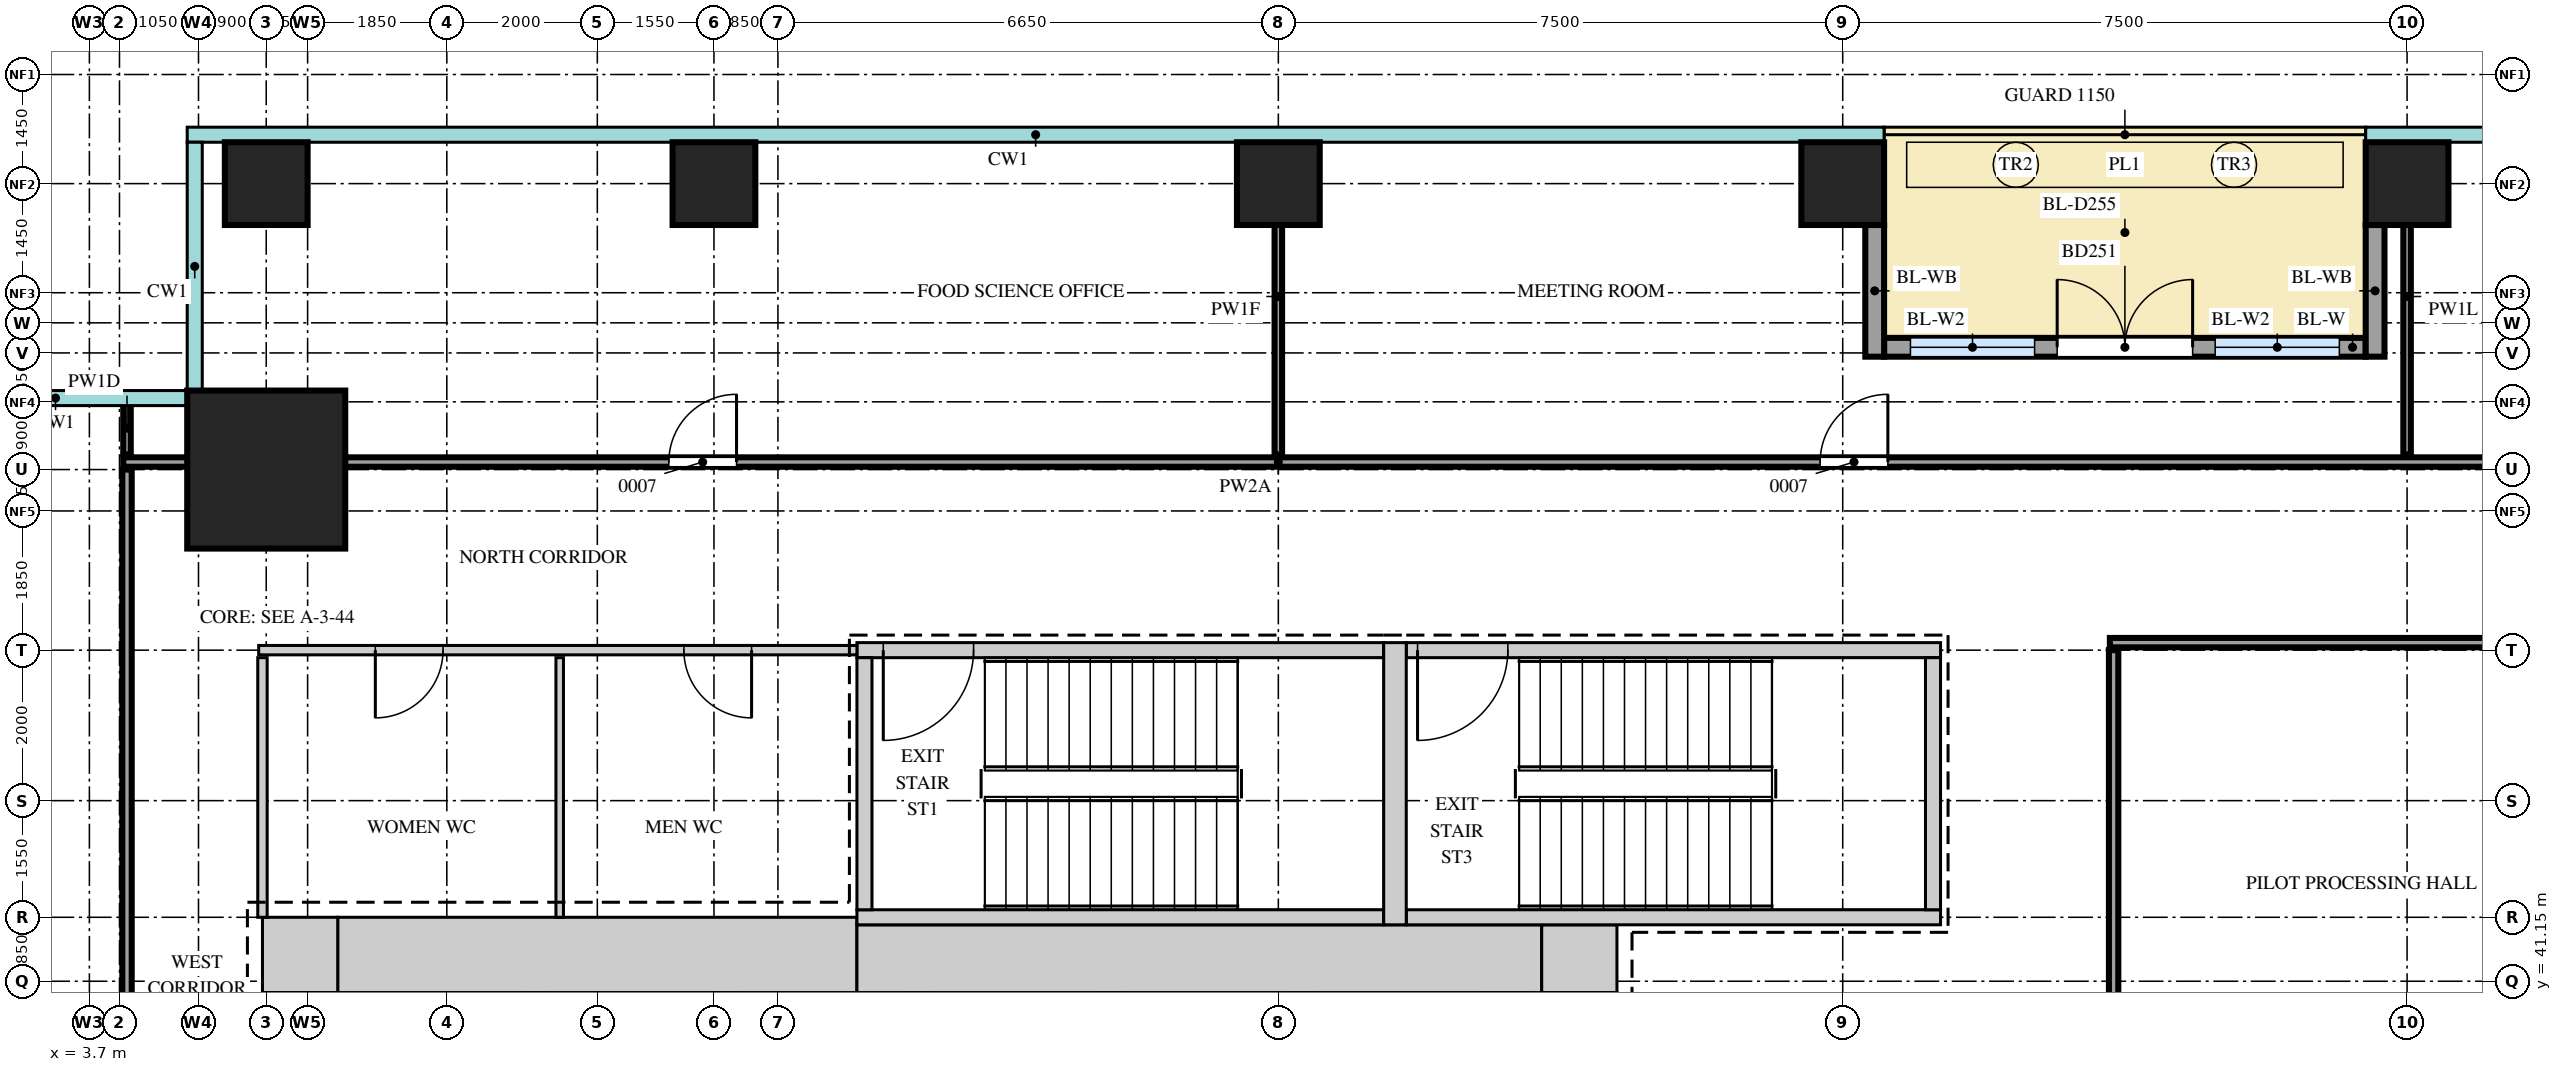
"""IFC4 building model, lengths in metres.
Left out: names, types, materials, properties, quantities, classifications, styles, units other than length and angle.
Written with IfcOpenShell. Run it as: python <this file> out.ifc"""

import sys

from ifc_helpers import new_model, si_unit, direction, frame, frame_2d, origin, origin_2d, place, context, subcontext, project, spatial, rectangle, extrude, source, transform, mapped, element, fill, save


model = new_model("IFC4")
c1 = context("Model", 3, precision=1e-05, world=origin(), true_north=direction((0.0, 1.0)))
c2 = subcontext(c1, "Body", "Model", "MODEL_VIEW")
j1 = project(units=[si_unit("LENGTHUNIT", "METRE"), si_unit("PLANEANGLEUNIT", "RADIAN")], contexts=[c1])
p1 = place(None, origin())
s1 = spatial("IfcSite", under=j1, at=p1, CompositionType="ELEMENT")
p2 = place(p1, origin())
s2 = spatial("IfcBuilding", under=s1, at=p2, CompositionType="ELEMENT")
p3 = place(p2, frame((0.0, 0.0, 119.1)))
s3 = spatial("IfcBuildingStorey", under=s2, at=p3, CompositionType="ELEMENT", Elevation=119.1)
m1 = source(origin(), c2, "Body", "SweptSolid", [
    extrude(rectangle(XDim=6.9, YDim=1.0, at=frame_2d((3.45, 0.0))), origin(), (0.0, 0.0, 1.0), 4.1),
])
p4 = place(p3, frame((7.0, 41.5, 0.0), z_axis=(0.0, 0.0, 1.0), x_axis=(1.0, 0.0, 0.0)))
e1 = element("IfcWall", 1, at=p4, inside=s3, PredefinedType="SHEAR", context=c2, shape_type="MappedRepresentation", body=[
    mapped(m1, transform((0.0, 0.0, 0.0))),
])
m2 = source(origin(), c2, "Body", "SweptSolid", [
    extrude(rectangle(XDim=9.1, YDim=0.9, at=frame_2d((4.55, 0.0))), origin(), (0.0, 0.0, 1.0), 4.1),
])
p5 = place(p3, frame((13.9, 41.45, 0.0), z_axis=(0.0, 0.0, 1.0), x_axis=(1.0, 0.0, 0.0)))
e2 = element("IfcWall", 2, at=p5, inside=s3, PredefinedType="SHEAR", context=c2, shape_type="MappedRepresentation", body=[
    mapped(m2, transform((0.0, 0.0, 0.0))),
])
m3 = source(origin(), c2, "Body", "SweptSolid", [
    extrude(rectangle(XDim=1.0, YDim=0.9, at=frame_2d((0.5, 0.0))), origin(), (0.0, 0.0, 1.0), 4.1),
])
p6 = place(p3, frame((23.0, 41.45, 0.0), z_axis=(0.0, 0.0, 1.0), x_axis=(1.0, 0.0, 0.0)))
e3 = element("IfcWall", 3, at=p6, inside=s3, PredefinedType="SHEAR", context=c2, shape_type="MappedRepresentation", body=[
    mapped(m3, transform((0.0, 0.0, 0.0))),
])
m4 = source(origin(), c2, "Body", "SweptSolid", [
    extrude(rectangle(XDim=1.0, YDim=1.0, at=frame_2d((0.5, 0.0))), origin(), (0.0, 0.0, 1.0), 4.1),
])
p7 = place(p3, frame((6.0, 41.5, 0.0), z_axis=(0.0, 0.0, 1.0), x_axis=(1.0, 0.0, 0.0)))
e4 = element("IfcWall", 4, at=p7, inside=s3, PredefinedType="SHEAR", context=c2, shape_type="MappedRepresentation", body=[
    mapped(m4, transform((0.0, 0.0, 0.0))),
])
m5 = source(origin(), c2, "Body", "SweptSolid", [
    extrude(rectangle(XDim=7.0, YDim=0.2, at=frame_2d((3.5, 0.0))), origin(), (0.0, 0.0, 1.0), 4.1),
])
p8 = place(p3, frame((13.9, 45.55, 0.0), z_axis=(0.0, 0.0, 1.0), x_axis=(1.0, 0.0, 0.0)))
e5 = element("IfcWall", 5, at=p8, inside=s3, PredefinedType="SHEAR", context=c2, shape_type="MappedRepresentation", body=[
    mapped(m5, transform((0.0, 0.0, 0.0))),
])
m6 = source(origin(), c2, "Body", "SweptSolid", [
    extrude(rectangle(XDim=1.2, YDim=2.1, at=frame_2d((0.6, 1.05))), frame((0.0, 0.11, 0.0), z_axis=(0.0, -1.0, 0.0), x_axis=(1.0, 0.0, 0.0)), (0.0, 0.0, 1.0), 0.22),
])
p9 = place(p8, frame((0.35, 0.0, 0.0)))
e6 = element("IfcOpeningElement", 6, at=p9, cuts=e5, PredefinedType="OPENING", context=c2, shape_type="MappedRepresentation", body=[
    mapped(m6, transform((0.0, 0.0, 0.0))),
])
p10 = place(p3, frame((13.9, 42.0, 0.0), z_axis=(0.0, 0.0, 1.0), x_axis=(1.0, 0.0, 0.0)))
e7 = element("IfcWall", 7, at=p10, inside=s3, PredefinedType="SHEAR", context=c2, shape_type="MappedRepresentation", body=[
    mapped(m5, transform((0.0, 0.0, 0.0))),
])
m7 = source(origin(), c2, "Body", "SweptSolid", [
    extrude(rectangle(XDim=7.1, YDim=0.2, at=frame_2d((3.55, 0.0))), origin(), (0.0, 0.0, 1.0), 4.1),
])
p11 = place(p3, frame((21.2, 45.55, 0.0), z_axis=(0.0, 0.0, 1.0), x_axis=(1.0, 0.0, 0.0)))
e8 = element("IfcWall", 8, at=p11, inside=s3, PredefinedType="SHEAR", context=c2, shape_type="MappedRepresentation", body=[
    mapped(m7, transform((0.0, 0.0, 0.0))),
])
p12 = place(p11, frame((0.15, 0.0, 0.0)))
e9 = element("IfcOpeningElement", 9, at=p12, cuts=e8, PredefinedType="OPENING", context=c2, shape_type="MappedRepresentation", body=[
    mapped(m6, transform((0.0, 0.0, 0.0))),
])
p13 = place(p3, frame((21.2, 42.0, 0.0), z_axis=(0.0, 0.0, 1.0), x_axis=(1.0, 0.0, 0.0)))
e10 = element("IfcWall", 10, at=p13, inside=s3, PredefinedType="SHEAR", context=c2, shape_type="MappedRepresentation", body=[
    mapped(m7, transform((0.0, 0.0, 0.0))),
])
m8 = source(origin(), c2, "Body", "SweptSolid", [
    extrude(rectangle(XDim=3.75, YDim=0.3, at=frame_2d((1.875, 0.0))), origin(), (0.0, 0.0, 1.0), 4.1),
])
p14 = place(p3, frame((21.05, 41.9, 0.0), z_axis=(0.0, 0.0, 1.0), x_axis=(0.0, 1.0, 0.0)))
e11 = element("IfcWall", 11, at=p14, inside=s3, PredefinedType="SHEAR", context=c2, shape_type="MappedRepresentation", body=[
    mapped(m8, transform((0.0, 0.0, 0.0))),
])
m9 = source(origin(), c2, "Body", "SweptSolid", [
    extrude(rectangle(XDim=3.35, YDim=0.2, at=frame_2d((1.675, 0.0))), origin(), (0.0, 0.0, 1.0), 4.1),
])
for number, where, z_axis, x_axis in (
    (12, (14.0, 42.1, 0.0), (0.0, 0.0, 1.0), (0.0, 1.0, 0.0)),
    (13, (28.2, 42.1, 0.0), (0.0, 0.0, 1.0), (0.0, 1.0, 0.0)),
):
    element("IfcWall", number, at=place(p3, frame(where, z_axis=z_axis, x_axis=x_axis)), inside=s3, PredefinedType="SHEAR", context=c2, shape_type="MappedRepresentation", body=[
        mapped(m9, transform((0.0, 0.0, 0.0))),
    ])
m10 = source(origin(), c2, "Body", "SweptSolid", [
    extrude(rectangle(XDim=2.1, YDim=2.1, at=origin_2d()), origin(), (0.0, 0.0, 1.0), 4.4),
])
p15 = place(p3, frame((6.05, 47.95, 0.0), z_axis=(0.0, 0.0, 1.0), x_axis=(1.0, 0.0, 0.0)))
e14 = element("IfcColumn", 14, at=p15, inside=s3, PredefinedType="COLUMN", context=c2, shape_type="MappedRepresentation", body=[
    mapped(m10, transform((0.0, 0.0, 0.0))),
])
m11 = source(origin(), c2, "Body", "SweptSolid", [
    extrude(rectangle(XDim=1.1, YDim=1.1, at=origin_2d()), origin(), (0.0, 0.0, 1.0), 4.1),
])
for number, where, z_axis, x_axis in (
    (15, (6.05, 51.75, 0.0), (0.0, 0.0, 1.0), (1.0, 0.0, 0.0)),
    (16, (12.0, 51.75, 0.0), (0.0, 0.0, 1.0), (1.0, 0.0, 0.0)),
    (17, (19.5, 51.75, 0.0), (0.0, 0.0, 1.0), (1.0, 0.0, 0.0)),
    (18, (27.0, 51.75, 0.0), (0.0, 0.0, 1.0), (1.0, 0.0, 0.0)),
    (19, (34.5, 51.75, 0.0), (0.0, 0.0, 1.0), (1.0, 0.0, 0.0)),
):
    element("IfcColumn", number, at=place(p3, frame(where, z_axis=z_axis, x_axis=x_axis)), inside=s3, PredefinedType="COLUMN", context=c2, shape_type="MappedRepresentation", body=[
        mapped(m11, transform((0.0, 0.0, 0.0))),
    ])
m12 = source(origin(), c2, "Body", "SweptSolid", [
    extrude(rectangle(XDim=6.4, YDim=0.25, at=frame_2d((3.2, 0.0))), origin(), (0.0, 0.0, 1.0), 4.1),
])
p16 = place(p3, frame((27.55, 49.575, 0.0), z_axis=(0.0, 0.0, 1.0), x_axis=(1.0, 0.0, 0.0)))
e20 = element("IfcWall", 20, at=p16, inside=s3, PredefinedType="SOLIDWALL", context=c2, shape_type="MappedRepresentation", body=[
    mapped(m12, transform((0.0, 0.0, 0.0))),
])
m13 = source(origin(), c2, "Body", "SweptSolid", [
    extrude(rectangle(XDim=1.65, YDim=2.4, at=frame_2d((0.825, 1.2))), frame((0.0, 0.135, 0.0), z_axis=(0.0, -1.0, 0.0), x_axis=(1.0, 0.0, 0.0)), (0.0, 0.0, 1.0), 0.27),
])
p17 = place(p16, frame((0.35, 0.0, 0.0)))
e21 = element("IfcOpeningElement", 21, at=p17, cuts=e20, PredefinedType="OPENING", context=c2, shape_type="MappedRepresentation", body=[
    mapped(m13, transform((0.0, 0.0, 0.0))),
])
p18 = place(p16, frame((4.4, 0.0, 0.0)))
e22 = element("IfcOpeningElement", 22, at=p18, cuts=e20, PredefinedType="OPENING", context=c2, shape_type="MappedRepresentation", body=[
    mapped(m13, transform((0.0, 0.0, 0.0))),
])
m14 = source(origin(), c2, "Body", "SweptSolid", [
    extrude(rectangle(XDim=1.8, YDim=2.4, at=frame_2d((0.9, 1.2))), frame((0.0, 0.135, 0.0), z_axis=(0.0, -1.0, 0.0), x_axis=(1.0, 0.0, 0.0)), (0.0, 0.0, 1.0), 0.27),
])
p19 = place(p16, frame((2.3, 0.0, 0.0)))
e23 = element("IfcOpeningElement", 23, at=p19, cuts=e20, PredefinedType="OPENING", context=c2, shape_type="MappedRepresentation", body=[
    mapped(m14, transform((0.0, 0.0, 0.0))),
])
m15 = source(origin(), c2, "Body", "SweptSolid", [
    extrude(rectangle(XDim=1.75, YDim=0.25, at=frame_2d((0.875, 0.0))), origin(), (0.0, 0.0, 1.0), 3.8),
])
for number, where, z_axis, x_axis in (
    (24, (27.425, 51.2, 0.0), (0.0, 0.0, 1.0), (0.0, -1.0, 0.0)),
    (25, (34.075, 51.2, 0.0), (0.0, 0.0, 1.0), (0.0, -1.0, 0.0)),
):
    element("IfcWall", number, at=place(p3, frame(where, z_axis=z_axis, x_axis=x_axis)), inside=s3, PredefinedType="SOLIDWALL", context=c2, shape_type="MappedRepresentation", body=[
        mapped(m15, transform((0.0, 0.0, 0.0))),
    ])
m16 = source(origin(), c2, "Body", "SweptSolid", [
    extrude(rectangle(XDim=28.75, YDim=0.125, at=frame_2d((14.375, 0.0))), origin(), (0.0, 0.0, 1.0), 4.2),
])
p20 = place(p3, frame((4.2, 19.2, 0.0), z_axis=(0.0, 0.0, 1.0), x_axis=(0.0, 1.0, 0.0)))
e26 = element("IfcWall", 26, at=p20, inside=s3, PredefinedType="PARTITIONING", context=c2, shape_type="MappedRepresentation", body=[
    mapped(m16, transform((0.0, 0.0, 0.0))),
])
m17 = source(origin(), c2, "Body", "SweptSolid", [
    extrude(rectangle(XDim=0.9, YDim=2.1, at=frame_2d((0.45, 1.05))), frame((0.0, 0.073, 0.0), z_axis=(0.0, -1.0, 0.0), x_axis=(1.0, 0.0, 0.0)), (0.0, 0.0, 1.0), 0.145),
])
p21 = place(p20, frame((3.45, 0.0, 0.0)))
e27 = element("IfcOpeningElement", 27, at=p21, cuts=e26, PredefinedType="OPENING", context=c2, shape_type="MappedRepresentation", body=[
    mapped(m17, transform((0.0, 0.0, 0.0))),
])
p22 = place(p20, frame((16.5, 0.0, 0.0)))
e28 = element("IfcOpeningElement", 28, at=p22, cuts=e26, PredefinedType="OPENING", context=c2, shape_type="MappedRepresentation", body=[
    mapped(m17, transform((0.0, 0.0, 0.0))),
])
m18 = source(origin(), c2, "Body", "SweptSolid", [
    extrude(rectangle(XDim=9.45, YDim=0.125, at=frame_2d((4.725, 0.0))), origin(), (0.0, 0.0, 1.0), 4.2),
])
p23 = place(p3, frame((30.6, 36.1, 0.0), z_axis=(0.0, 0.0, 1.0), x_axis=(0.0, 1.0, 0.0)))
e29 = element("IfcWall", 29, at=p23, inside=s3, PredefinedType="PARTITIONING", context=c2, shape_type="MappedRepresentation", body=[
    mapped(m18, transform((0.0, 0.0, 0.0))),
])
m19 = source(origin(), c2, "Body", "SweptSolid", [
    extrude(rectangle(XDim=3.45, YDim=0.125, at=frame_2d((1.725, 0.0))), origin(), (0.0, 0.0, 1.0), 4.2),
])
p24 = place(p3, frame((6.0, 42.0, 0.0), z_axis=(0.0, 0.0, 1.0), x_axis=(0.0, 1.0, 0.0)))
e30 = element("IfcWall", 30, at=p24, inside=s3, PredefinedType="PARTITIONING", context=c2, shape_type="MappedRepresentation", body=[
    mapped(m19, transform((0.0, 0.0, 0.0))),
])
m20 = source(origin(), c2, "Body", "SweptSolid", [
    extrude(rectangle(XDim=3.45, YDim=0.1, at=frame_2d((1.725, 0.0))), origin(), (0.0, 0.0, 1.0), 4.2),
])
p25 = place(p3, frame((9.95, 42.0, 0.0), z_axis=(0.0, 0.0, 1.0), x_axis=(0.0, 1.0, 0.0)))
e31 = element("IfcWall", 31, at=p25, inside=s3, PredefinedType="PARTITIONING", context=c2, shape_type="MappedRepresentation", body=[
    mapped(m20, transform((0.0, 0.0, 0.0))),
])
m21 = source(origin(), c2, "Body", "SweptSolid", [
    extrude(rectangle(XDim=7.95, YDim=0.125, at=frame_2d((3.975, 0.0))), origin(), (0.0, 0.0, 1.0), 4.2),
])
p26 = place(p3, frame((5.95, 45.55, 0.0), z_axis=(0.0, 0.0, 1.0), x_axis=(1.0, 0.0, 0.0)))
e32 = element("IfcWall", 32, at=p26, inside=s3, PredefinedType="PARTITIONING", context=c2, shape_type="MappedRepresentation", body=[
    mapped(m21, transform((0.0, 0.0, 0.0))),
])
p27 = place(p26, frame((1.55, 0.0, 0.0)))
e33 = element("IfcOpeningElement", 33, at=p27, cuts=e32, PredefinedType="OPENING", context=c2, shape_type="MappedRepresentation", body=[
    mapped(m17, transform((0.0, 0.0, 0.0))),
])
p28 = place(p26, frame((5.65, 0.0, 0.0)))
e34 = element("IfcOpeningElement", 34, at=p28, cuts=e32, PredefinedType="OPENING", context=c2, shape_type="MappedRepresentation", body=[
    mapped(m17, transform((0.0, 0.0, 0.0))),
])
m22 = source(origin(), c2, "Body", "SweptSolid", [
    extrude(rectangle(XDim=13.5, YDim=0.125, at=frame_2d((6.75, 0.0))), origin(), (0.0, 0.0, 1.0), 4.2),
])
p29 = place(p3, frame((30.55, 45.65, 0.0), z_axis=(0.0, 0.0, 1.0), x_axis=(1.0, 0.0, 0.0)))
e35 = element("IfcWall", 35, at=p29, inside=s3, PredefinedType="PARTITIONING", context=c2, shape_type="MappedRepresentation", body=[
    mapped(m22, transform((0.0, 0.0, 0.0))),
])
m23 = source(origin(), c2, "Body", "SweptSolid", [
    extrude(rectangle(XDim=42.2, YDim=0.125, at=frame_2d((21.1, 0.0))), origin(), (0.0, 0.0, 1.0), 3.55),
])
p30 = place(p3, frame((4.15, 48.05, 0.0), z_axis=(0.0, 0.0, 1.0), x_axis=(1.0, 0.0, 0.0)))
e36 = element("IfcWall", 36, at=p30, inside=s3, PredefinedType="PARTITIONING", context=c2, shape_type="MappedRepresentation", body=[
    mapped(m23, transform((0.0, 0.0, 0.0))),
])
p31 = place(p30, frame((7.25, 0.0, 0.0)))
e37 = element("IfcOpeningElement", 37, at=p31, cuts=e36, PredefinedType="OPENING", context=c2, shape_type="MappedRepresentation", body=[
    mapped(m17, transform((0.0, 0.0, 0.0))),
])
p32 = place(p30, frame((22.55, 0.0, 0.0)))
e38 = element("IfcOpeningElement", 38, at=p32, cuts=e36, PredefinedType="OPENING", context=c2, shape_type="MappedRepresentation", body=[
    mapped(m17, transform((0.0, 0.0, 0.0))),
])
p33 = place(p30, frame((35.85, 0.0, 0.0)))
e39 = element("IfcOpeningElement", 39, at=p33, cuts=e36, PredefinedType="OPENING", context=c2, shape_type="MappedRepresentation", body=[
    mapped(m17, transform((0.0, 0.0, 0.0))),
])
m24 = source(origin(), c2, "Body", "SweptSolid", [
    extrude(rectangle(XDim=0.7, YDim=0.1, at=frame_2d((0.35, 0.0))), origin(), (0.0, 0.0, 1.0), 4.2),
])
p34 = place(p3, frame((4.2, 48.15, 0.0), z_axis=(0.0, 0.0, 1.0), x_axis=(0.0, 1.0, 0.0)))
e40 = element("IfcWall", 40, at=p34, inside=s3, PredefinedType="PARTITIONING", context=c2, shape_type="MappedRepresentation", body=[
    mapped(m24, transform((0.0, 0.0, 0.0))),
])
m25 = source(origin(), c2, "Body", "SweptSolid", [
    extrude(rectangle(XDim=4.2, YDim=0.1, at=frame_2d((2.1, 0.0))), origin(), (0.0, 0.0, 1.0), 3.77),
])
p35 = place(p3, frame((19.5, 48.15, 0.0), z_axis=(0.0, 0.0, 1.0), x_axis=(0.0, 1.0, 0.0)))
e41 = element("IfcWall", 41, at=p35, inside=s3, PredefinedType="PARTITIONING", context=c2, shape_type="MappedRepresentation", body=[
    mapped(m25, transform((0.0, 0.0, 0.0))),
])
m26 = source(origin(), c2, "Body", "SweptSolid", [
    extrude(rectangle(XDim=4.2, YDim=0.1, at=frame_2d((2.1, 0.0))), origin(), (0.0, 0.0, 1.0), 3.6),
])
p36 = place(p3, frame((34.5, 48.15, 0.0), z_axis=(0.0, 0.0, 1.0), x_axis=(0.0, 1.0, 0.0)))
e42 = element("IfcWall", 42, at=p36, inside=s3, PredefinedType="PARTITIONING", context=c2, shape_type="MappedRepresentation", body=[
    mapped(m26, transform((0.0, 0.0, 0.0))),
])
m27 = source(origin(), c2, "Body", "SweptSolid", [
    extrude(rectangle(XDim=1.65, YDim=2.4, at=frame_2d((0.825, 1.2))), frame((0.0, 0.03, 0.0), z_axis=(0.0, -1.0, 0.0), x_axis=(1.0, 0.0, 0.0)), (0.0, 0.0, 1.0), 0.06),
])
p37 = place(p17, origin())
e43 = element("IfcWindow", 43, at=p37, inside=s3, PartitioningType="SINGLE_PANEL", PredefinedType="WINDOW", context=c2, shape_type="MappedRepresentation", body=[
    mapped(m27, transform((0.0, 0.0, 0.0))),
])
fill(e21, e43)
p38 = place(p18, origin())
e44 = element("IfcWindow", 44, at=p38, inside=s3, PartitioningType="SINGLE_PANEL", PredefinedType="WINDOW", context=c2, shape_type="MappedRepresentation", body=[
    mapped(m27, transform((0.0, 0.0, 0.0))),
])
fill(e22, e44)
m28 = source(origin(), c2, "Body", "SweptSolid", [
    extrude(rectangle(XDim=1.8, YDim=2.4, at=frame_2d((0.9, 1.2))), frame((0.0, 0.025, 0.0), z_axis=(0.0, -1.0, 0.0), x_axis=(1.0, 0.0, 0.0)), (0.0, 0.0, 1.0), 0.05),
])
p39 = place(p19, origin())
e45 = element("IfcDoor", 45, at=p39, inside=s3, OperationType="DOUBLE_DOOR_DOUBLE_SWING", PredefinedType="DOOR", context=c2, shape_type="MappedRepresentation", body=[
    mapped(m28, transform((0.0, 0.0, 0.0))),
])
fill(e23, e45)
m29 = source(origin(), c2, "Body", "SweptSolid", [
    extrude(rectangle(XDim=0.9, YDim=2.1, at=frame_2d((0.45, 1.05))), frame((0.0, 0.025, 0.0), z_axis=(0.0, -1.0, 0.0), x_axis=(1.0, 0.0, 0.0)), (0.0, 0.0, 1.0), 0.05),
])
p40 = place(p31, origin())
e46 = element("IfcDoor", 46, at=p40, inside=s3, OperationType="SINGLE_SWING_LEFT", PredefinedType="DOOR", context=c2, shape_type="MappedRepresentation", body=[
    mapped(m29, transform((0.0, 0.0, 0.0))),
])
fill(e37, e46)
p41 = place(p32, origin())
e47 = element("IfcDoor", 47, at=p41, inside=s3, OperationType="SINGLE_SWING_LEFT", PredefinedType="DOOR", context=c2, shape_type="MappedRepresentation", body=[
    mapped(m29, transform((0.0, 0.0, 0.0))),
])
fill(e38, e47)
p42 = place(p27, origin())
e48 = element("IfcDoor", 48, at=p42, inside=s3, OperationType="SINGLE_SWING_LEFT", PredefinedType="DOOR", context=c2, shape_type="MappedRepresentation", body=[
    mapped(m29, transform((0.0, 0.0, 0.0))),
])
fill(e33, e48)
p43 = place(p28, origin())
e49 = element("IfcDoor", 49, at=p43, inside=s3, OperationType="SINGLE_SWING_RIGHT", PredefinedType="DOOR", context=c2, shape_type="MappedRepresentation", body=[
    mapped(m29, transform((0.0, 0.0, 0.0))),
])
fill(e34, e49)
m30 = source(origin(), c2, "Body", "SweptSolid", [
    extrude(rectangle(XDim=1.2, YDim=2.1, at=frame_2d((0.6, 1.05))), frame((0.0, 0.025, 0.0), z_axis=(0.0, -1.0, 0.0), x_axis=(1.0, 0.0, 0.0)), (0.0, 0.0, 1.0), 0.05),
])
p44 = place(p9, origin())
e50 = element("IfcDoor", 50, at=p44, inside=s3, OperationType="SINGLE_SWING_LEFT", PredefinedType="DOOR", context=c2, shape_type="MappedRepresentation", body=[
    mapped(m30, transform((0.0, 0.0, 0.0))),
])
fill(e6, e50)
p45 = place(p12, origin())
e51 = element("IfcDoor", 51, at=p45, inside=s3, OperationType="SINGLE_SWING_LEFT", PredefinedType="DOOR", context=c2, shape_type="MappedRepresentation", body=[
    mapped(m30, transform((0.0, 0.0, 0.0))),
])
fill(e9, e51)
save(model, sys.argv[1])
